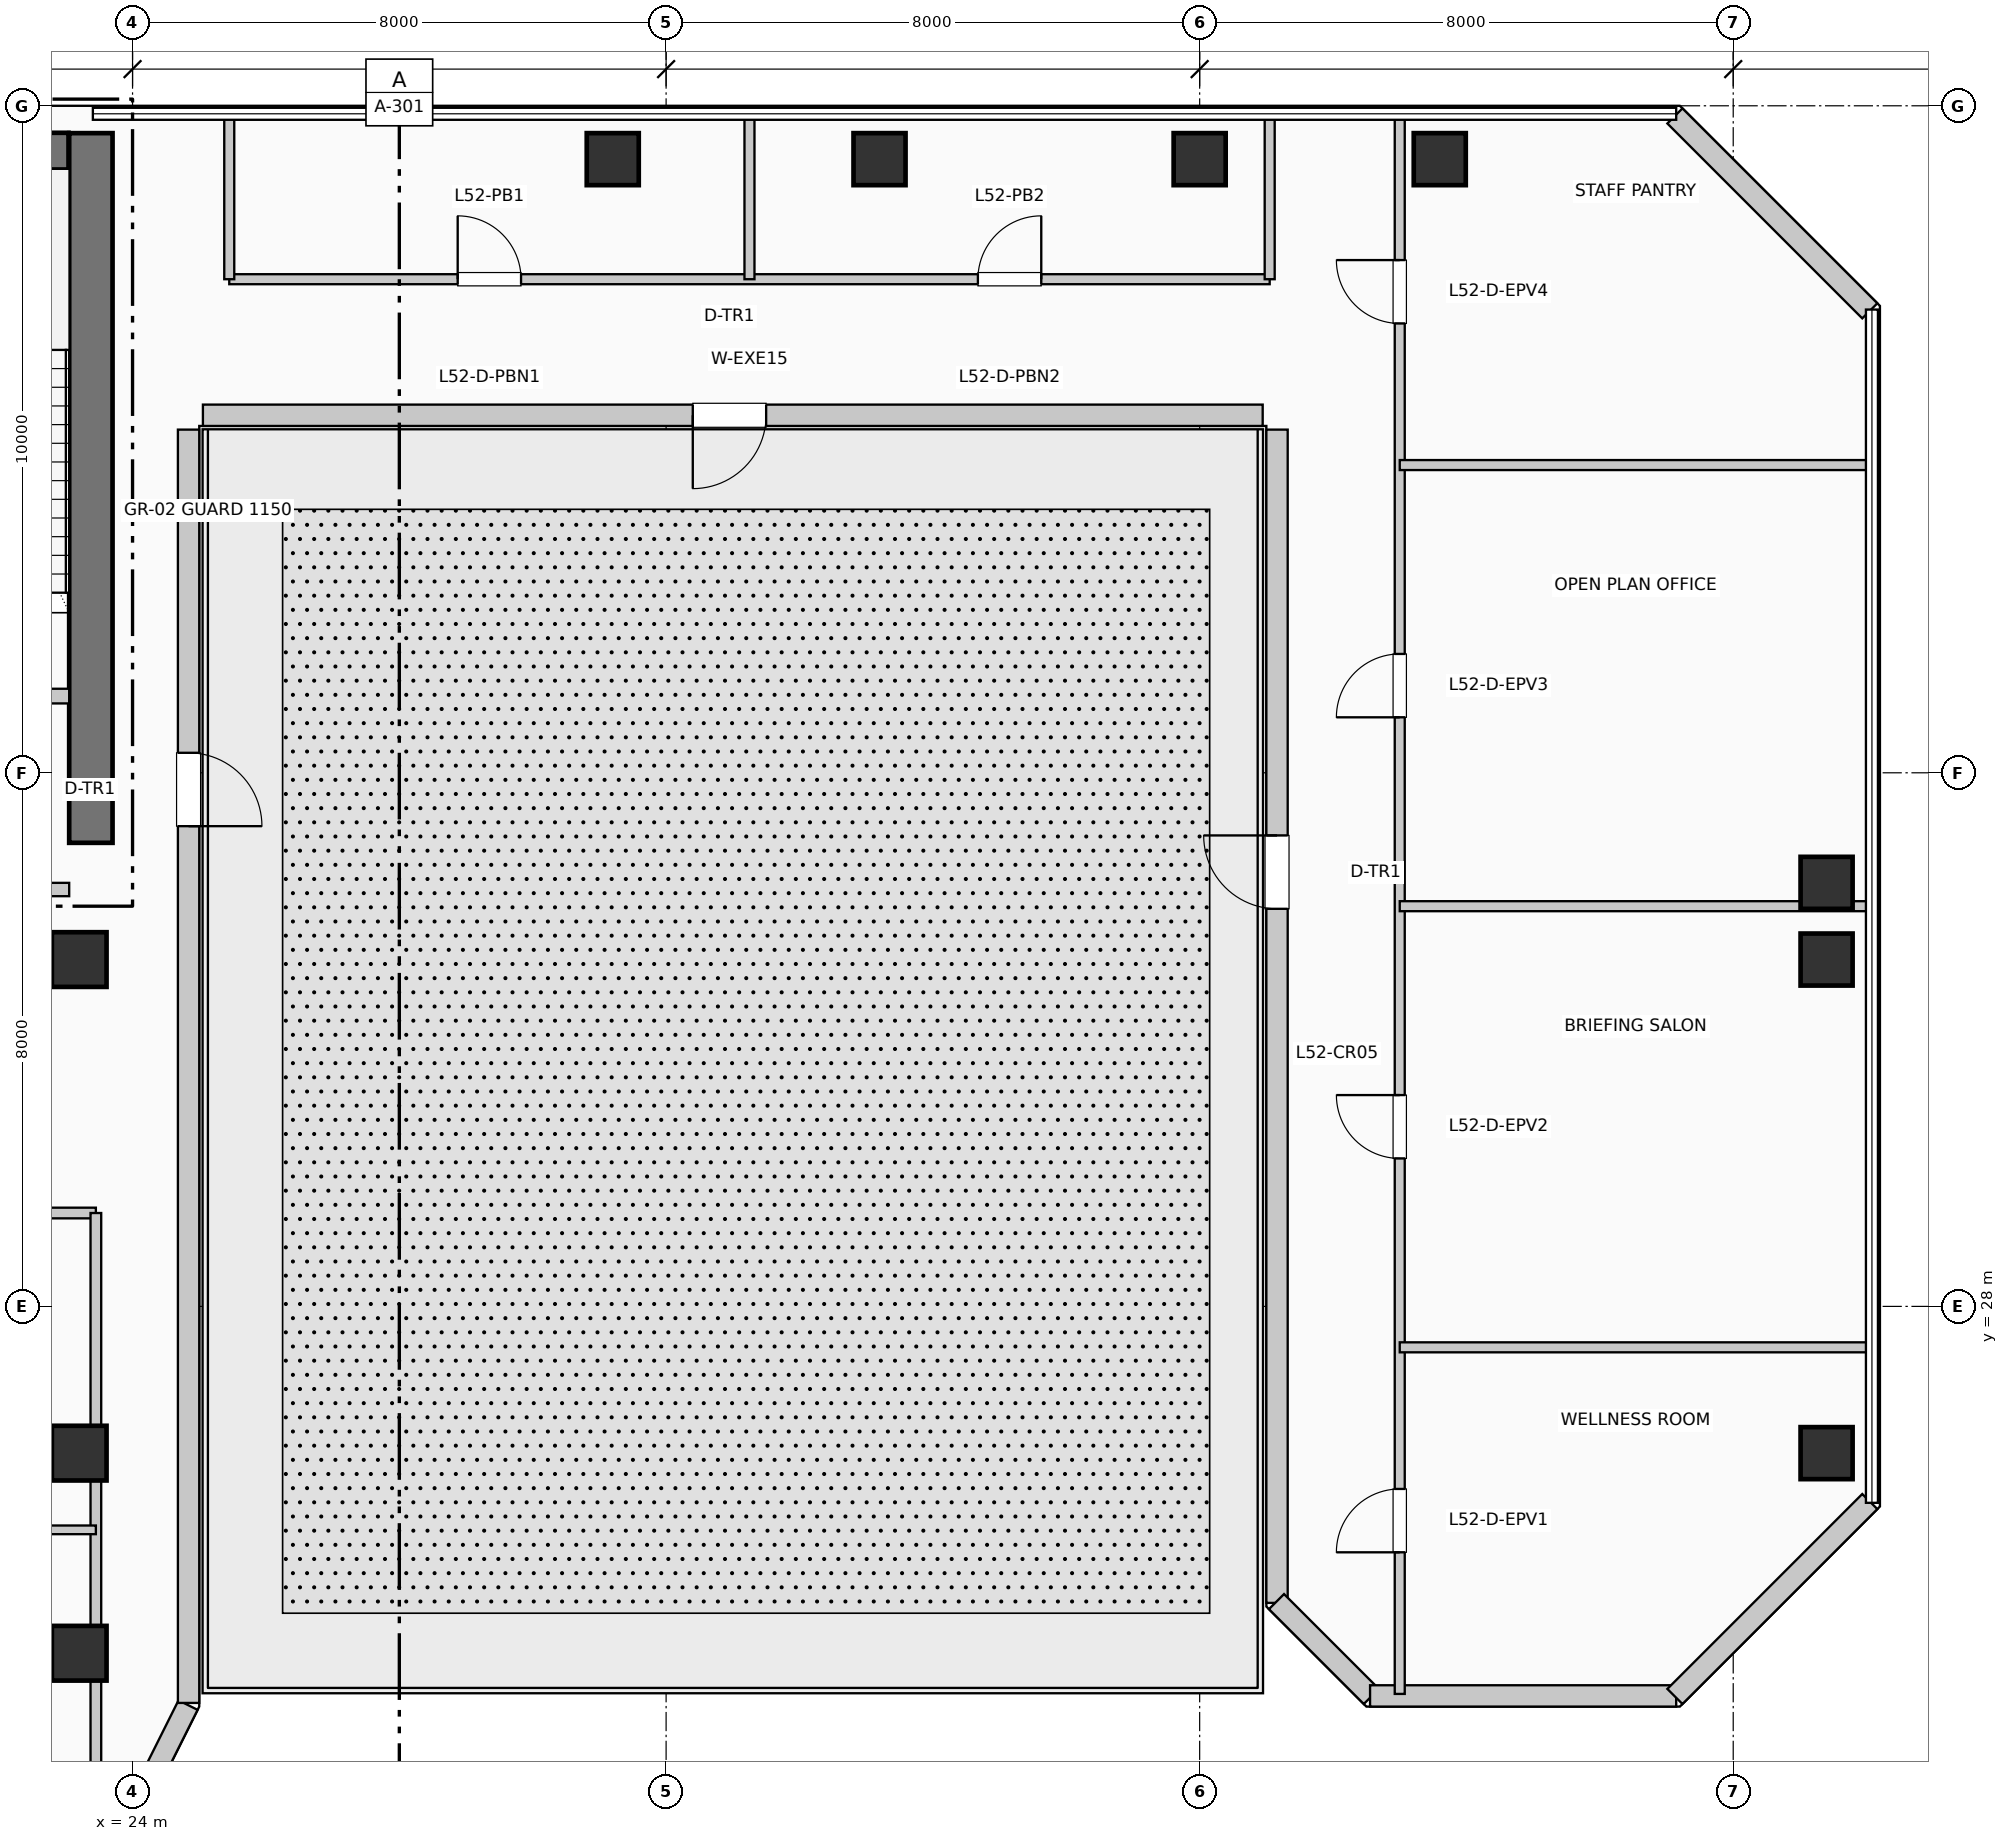
"""IFC4 building model, lengths in metres.
Left out: names, types, materials, properties, quantities, classifications, styles, units other than length and angle.
Written with IfcOpenShell. Run it as: python <this file> out.ifc"""

import sys

from ifc_helpers import new_model, si_unit, direction, frame, frame_2d, origin, origin_2d, place, context, subcontext, project, spatial, rectangle, extrude, element, fill, save


model = new_model("IFC4")
c1 = context("Model", 3, precision=1e-05, world=origin(), true_north=direction((0.0, 1.0)))
c2 = subcontext(c1, "Body", "Model", "MODEL_VIEW")
j1 = project(units=[si_unit("LENGTHUNIT", "METRE"), si_unit("PLANEANGLEUNIT", "RADIAN")], contexts=[c1])
p1 = place(None, origin())
s1 = spatial("IfcSite", under=j1, at=p1, CompositionType="ELEMENT")
p2 = place(p1, origin())
s2 = spatial("IfcBuilding", under=s1, at=p2, CompositionType="ELEMENT")
p3 = place(p2, frame((0.0, 0.0, 215.16)))
s3 = spatial("IfcBuildingStorey", under=s2, at=p3, CompositionType="ELEMENT", Elevation=215.16)
p4 = place(p3, frame((23.375, 34.95, 0.0), z_axis=(0.0, 0.0, 1.0), x_axis=(0.0, 1.0, 0.0)))
e1 = element("IfcWall", 1, at=p4, inside=s3, PredefinedType="SHEAR", context=c2, shape_type="SweptSolid", body=[
    extrude(rectangle(XDim=10.64, YDim=0.65, at=frame_2d((5.32, 0.0))), origin(), (0.0, 0.0, 1.0), 4.62),
])
p5 = place(p3, frame((19.35, 45.32, 0.0), z_axis=(0.0, 0.0, 1.0), x_axis=(1.0, 0.0, 0.0)))
e2 = element("IfcWall", 2, at=p5, inside=s3, PredefinedType="SHEAR", context=c2, shape_type="SweptSolid", body=[
    extrude(rectangle(XDim=3.69, YDim=0.55, at=frame_2d((1.845, 0.0))), origin(), (0.0, 0.0, 1.0), 4.62),
])
p6 = place(p5, frame((1.15, 0.0, 1.05)))
e3 = element("IfcOpeningElement", 3, at=p6, cuts=e2, PredefinedType="OPENING", context=c2, shape_type="SweptSolid", body=[
    extrude(rectangle(XDim=1.4, YDim=1.8, at=frame_2d((0.7, 0.9))), frame((0.0, 0.285, 0.0), z_axis=(0.0, -1.0, 0.0), x_axis=(1.0, 0.0, 0.0)), (0.0, 0.0, 1.0), 0.57),
])
for number, where, z_axis, x_axis in (
    (4, (23.2, 22.8, 0.0), (0.0, 0.0, 1.0), (1.0, 0.0, 0.0)),
    (5, (23.2, 25.8, 0.0), (0.0, 0.0, 1.0), (1.0, 0.0, 0.0)),
    (6, (23.2, 33.2, 0.0), (0.0, 0.0, 1.0), (1.0, 0.0, 0.0)),
):
    element("IfcColumn", number, at=place(p3, frame(where, z_axis=z_axis, x_axis=x_axis)), inside=s3, PredefinedType="COLUMN", context=c2, shape_type="SweptSolid", body=[
        extrude(rectangle(XDim=0.82, YDim=0.82, at=origin_2d()), origin(), (0.0, 0.0, 1.0), 4.62),
    ])
for number, where, z_axis, x_axis in (
    (7, (31.2, 45.2, 0.0), (0.0, 0.0, 1.0), (1.0, 0.0, 0.0)),
    (8, (35.2, 45.2, 0.0), (0.0, 0.0, 1.0), (1.0, 0.0, 0.0)),
    (9, (40.0, 45.2, 0.0), (0.0, 0.0, 1.0), (1.0, 0.0, 0.0)),
    (10, (43.6, 45.2, 0.0), (0.0, 0.0, 1.0), (1.0, 0.0, 0.0)),
    (11, (49.4, 25.8, 0.0), (0.0, 0.0, 1.0), (1.0, 0.0, 0.0)),
    (12, (49.4, 33.2, 0.0), (0.0, 0.0, 1.0), (1.0, 0.0, 0.0)),
    (13, (49.4, 34.35, 0.0), (0.0, 0.0, 1.0), (1.0, 0.0, 0.0)),
):
    element("IfcColumn", number, at=place(p3, frame(where, z_axis=z_axis, x_axis=x_axis)), inside=s3, PredefinedType="COLUMN", context=c2, shape_type="SweptSolid", body=[
        extrude(rectangle(XDim=0.78, YDim=0.78, at=origin_2d()), origin(), (0.0, 0.0, 1.0), 4.62),
    ])
p7 = place(p3, frame((23.882, 20.121, 0.0), z_axis=(0.0, 0.0, 1.0), x_axis=(0.447121734542, 0.894473115583, 0.0)))
e14 = element("IfcWall", 14, at=p7, inside=s3, PredefinedType="SOLIDWALL", context=c2, shape_type="SweptSolid", body=[
    extrude(rectangle(XDim=2.126, YDim=0.32, at=frame_2d((1.063, 0.0))), origin(), (0.0, 0.0, 1.0), 4.37),
])
p8 = place(p3, frame((24.84, 22.055, 0.0), z_axis=(0.0, 0.0, 1.0), x_axis=(0.0, 1.0, 0.0)))
e15 = element("IfcWall", 15, at=p8, inside=s3, PredefinedType="SOLIDWALL", context=c2, shape_type="SweptSolid", body=[
    extrude(rectangle(XDim=19.09, YDim=0.32, at=frame_2d((9.545, 0.0))), origin(), (0.0, 0.0, 1.0), 4.37),
])
p9 = place(p8, frame((14.245, 0.0, 0.0), z_axis=(0.0, 0.0, 1.0), x_axis=(-1.0, 0.0, 0.0)))
e16 = element("IfcOpeningElement", 16, at=p9, cuts=e15, PredefinedType="OPENING", context=c2, shape_type="SweptSolid", body=[
    extrude(rectangle(XDim=1.1, YDim=2.2, at=frame_2d((0.55, 1.1))), frame((0.0, 0.17, 0.0), z_axis=(0.0, -1.0, 0.0), x_axis=(1.0, 0.0, 0.0)), (0.0, 0.0, 1.0), 0.34),
])
p10 = place(p3, frame((25.055, 41.36, 0.0), z_axis=(0.0, 0.0, 1.0), x_axis=(1.0, 0.0, 0.0)))
e17 = element("IfcWall", 17, at=p10, inside=s3, PredefinedType="SOLIDWALL", context=c2, shape_type="SweptSolid", body=[
    extrude(rectangle(XDim=15.89, YDim=0.32, at=frame_2d((7.945, 0.0))), origin(), (0.0, 0.0, 1.0), 4.37),
])
p11 = place(p10, frame((8.445, 0.0, 0.0), z_axis=(0.0, 0.0, 1.0), x_axis=(-1.0, 0.0, 0.0)))
e18 = element("IfcOpeningElement", 18, at=p11, cuts=e17, PredefinedType="OPENING", context=c2, shape_type="SweptSolid", body=[
    extrude(rectangle(XDim=1.1, YDim=2.2, at=frame_2d((0.55, 1.1))), frame((0.0, 0.17, 0.0), z_axis=(0.0, -1.0, 0.0), x_axis=(1.0, 0.0, 0.0)), (0.0, 0.0, 1.0), 0.34),
])
p12 = place(p3, frame((41.16, 41.145, 0.0), z_axis=(0.0, 0.0, 1.0), x_axis=(0.0, -1.0, 0.0)))
e19 = element("IfcWall", 19, at=p12, inside=s3, PredefinedType="SOLIDWALL", context=c2, shape_type="SweptSolid", body=[
    extrude(rectangle(XDim=17.59, YDim=0.32, at=frame_2d((8.795, 0.0))), origin(), (0.0, 0.0, 1.0), 4.37),
])
p13 = place(p12, frame((7.184, 0.0, 0.0), z_axis=(0.0, 0.0, 1.0), x_axis=(-1.0, 0.0, 0.0)))
e20 = element("IfcOpeningElement", 20, at=p13, cuts=e19, PredefinedType="OPENING", context=c2, shape_type="SweptSolid", body=[
    extrude(rectangle(XDim=1.1, YDim=2.2, at=frame_2d((0.55, 1.1))), frame((0.0, 0.17, 0.0), z_axis=(0.0, -1.0, 0.0), x_axis=(1.0, 0.0, 0.0)), (0.0, 0.0, 1.0), 0.34),
])
p14 = place(p3, frame((41.152, 23.574, 0.0), z_axis=(0.0, 0.0, 1.0), x_axis=(0.707106781187, -0.707106781187, 0.0)))
e21 = element("IfcWall", 21, at=p14, inside=s3, PredefinedType="SOLIDWALL", context=c2, shape_type="SweptSolid", body=[
    extrude(rectangle(XDim=2.011, YDim=0.32, at=frame_2d((1.006, 0.0))), origin(), (0.0, 0.0, 1.0), 4.37),
])
p15 = place(p3, frame((42.555, 22.16, 0.0), z_axis=(0.0, 0.0, 1.0), x_axis=(1.0, 0.0, 0.0)))
e22 = element("IfcWall", 22, at=p15, inside=s3, PredefinedType="SOLIDWALL", context=c2, shape_type="SweptSolid", body=[
    extrude(rectangle(XDim=4.59, YDim=0.32, at=frame_2d((2.295, 0.0))), origin(), (0.0, 0.0, 1.0), 4.37),
])
for number, where, z_axis, x_axis in (
    (23, (47.126, 22.152, 0.0), (0.0, 0.0, 1.0), (0.707, 0.707, 0.0)),
    (24, (50.048, 42.926, 0.0), (0.0, 0.0, 1.0), (-0.707, 0.707, 0.0)),
):
    element("IfcWall", number, at=place(p3, frame(where, z_axis=z_axis, x_axis=x_axis)), inside=s3, PredefinedType="SOLIDWALL", context=c2, shape_type="SweptSolid", body=[
        extrude(rectangle(XDim=4.133, YDim=0.32, at=frame_2d((2.066, 0.0))), origin(), (0.0, 0.0, 1.0), 4.37),
    ])
p16 = place(p3, frame((19.9, 37.15, 0.0), z_axis=(0.0, 0.0, 1.0), x_axis=(1.0, 0.0, 0.0)))
e25 = element("IfcWall", 25, at=p16, inside=s3, PredefinedType="PARTITIONING", context=c2, shape_type="SweptSolid", body=[
    extrude(rectangle(XDim=3.15, YDim=0.22, at=frame_2d((1.575, 0.0))), origin(), (0.0, 0.0, 1.0), 4.37),
])
p17 = place(p16, frame((2.05, 0.0, 0.0), z_axis=(0.0, 0.0, 1.0), x_axis=(-1.0, 0.0, 0.0)))
e26 = element("IfcOpeningElement", 26, at=p17, cuts=e25, PredefinedType="OPENING", context=c2, shape_type="SweptSolid", body=[
    extrude(rectangle(XDim=1.05, YDim=2.15, at=frame_2d((0.525, 1.075))), frame((0.0, 0.12, 0.0), z_axis=(0.0, -1.0, 0.0), x_axis=(1.0, 0.0, 0.0)), (0.0, 0.0, 1.0), 0.24),
])
p18 = place(p3, frame((19.8, 34.25, 0.0), z_axis=(0.0, 0.0, 1.0), x_axis=(1.0, 0.0, 0.0)))
e27 = element("IfcWall", 27, at=p18, inside=s3, PredefinedType="PARTITIONING", context=c2, shape_type="SweptSolid", body=[
    extrude(rectangle(XDim=3.25, YDim=0.2, at=frame_2d((1.625, 0.0))), origin(), (0.0, 0.0, 1.0), 4.37),
])
p19 = place(p18, frame((2.15, 0.0, 0.0), z_axis=(0.0, 0.0, 1.0), x_axis=(-1.0, 0.0, 0.0)))
e28 = element("IfcOpeningElement", 28, at=p19, cuts=e27, PredefinedType="OPENING", context=c2, shape_type="SweptSolid", body=[
    extrude(rectangle(XDim=1.1, YDim=2.15, at=frame_2d((0.55, 1.075))), frame((0.0, 0.11, 0.0), z_axis=(0.0, -1.0, 0.0), x_axis=(1.0, 0.0, 0.0)), (0.0, 0.0, 1.0), 0.22),
])
p20 = place(p3, frame((19.24, 29.4, 0.0), z_axis=(0.0, 0.0, 1.0), x_axis=(1.0, 0.0, 0.0)))
e29 = element("IfcWall", 29, at=p20, inside=s3, PredefinedType="PARTITIONING", context=c2, shape_type="SweptSolid", body=[
    extrude(rectangle(XDim=4.21, YDim=0.16, at=frame_2d((2.105, 0.0))), origin(), (0.0, 0.0, 1.0), 4.025),
])
p21 = place(p3, frame((23.45, 5.99, 0.0), z_axis=(0.0, 0.0, 1.0), x_axis=(0.0, 1.0, 0.0)))
e30 = element("IfcWall", 30, at=p21, inside=s3, PredefinedType="PARTITIONING", context=c2, shape_type="SweptSolid", body=[
    extrude(rectangle(XDim=23.41, YDim=0.16, at=frame_2d((11.705, 0.0))), origin(), (0.0, 0.0, 1.0), 3.755),
])
p22 = place(p3, frame((19.24, 24.65, 0.0), z_axis=(0.0, 0.0, 1.0), x_axis=(1.0, 0.0, 0.0)))
e31 = element("IfcWall", 31, at=p22, inside=s3, PredefinedType="PARTITIONING", context=c2, shape_type="SweptSolid", body=[
    extrude(rectangle(XDim=4.21, YDim=0.13, at=frame_2d((2.105, 0.0))), origin(), (0.0, 0.0, 1.0), 4.37),
])
p23 = place(p3, frame((25.45, 43.4, 0.0), z_axis=(0.0, 0.0, 1.0), x_axis=(1.0, 0.0, 0.0)))
e32 = element("IfcWall", 32, at=p23, inside=s3, PredefinedType="PARTITIONING", context=c2, shape_type="SweptSolid", body=[
    extrude(rectangle(XDim=15.6, YDim=0.15, at=frame_2d((7.8, 0.0))), origin(), (0.0, 0.0, 1.0), 4.37),
])
p24 = place(p23, frame((3.425, 0.0, 0.0)))
e33 = element("IfcOpeningElement", 33, at=p24, cuts=e32, PredefinedType="OPENING", context=c2, shape_type="SweptSolid", body=[
    extrude(rectangle(XDim=0.95, YDim=2.15, at=frame_2d((0.475, 1.075))), frame((0.0, 0.085, 0.0), z_axis=(0.0, -1.0, 0.0), x_axis=(1.0, 0.0, 0.0)), (0.0, 0.0, 1.0), 0.17),
])
p25 = place(p23, frame((11.225, 0.0, 0.0)))
e34 = element("IfcOpeningElement", 34, at=p25, cuts=e32, PredefinedType="OPENING", context=c2, shape_type="SweptSolid", body=[
    extrude(rectangle(XDim=0.95, YDim=2.15, at=frame_2d((0.475, 1.075))), frame((0.0, 0.085, 0.0), z_axis=(0.0, -1.0, 0.0), x_axis=(1.0, 0.0, 0.0)), (0.0, 0.0, 1.0), 0.17),
])
for number, where, z_axis, x_axis in (
    (35, (25.45, 43.4, 0.0), (0.0, 0.0, 1.0), (0.0, 1.0, 0.0)),
    (36, (41.05, 43.4, 0.0), (0.0, 0.0, 1.0), (0.0, 1.0, 0.0)),
    (37, (33.25, 43.4, 0.0), (0.0, 0.0, 1.0), (0.0, 1.0, 0.0)),
):
    element("IfcWall", number, at=place(p3, frame(where, z_axis=z_axis, x_axis=x_axis)), inside=s3, PredefinedType="PARTITIONING", context=c2, shape_type="SweptSolid", body=[
        extrude(rectangle(XDim=2.41, YDim=0.15, at=frame_2d((1.205, 0.0))), origin(), (0.0, 0.0, 1.0), 4.37),
    ])
p26 = place(p3, frame((43.0, 22.19, 0.0), z_axis=(0.0, 0.0, 1.0), x_axis=(0.0, 1.0, 0.0)))
e38 = element("IfcWall", 38, at=p26, inside=s3, PredefinedType="PARTITIONING", context=c2, shape_type="SweptSolid", body=[
    extrude(rectangle(XDim=23.62, YDim=0.15, at=frame_2d((11.81, 0.0))), origin(), (0.0, 0.0, 1.0), 4.37),
])
p27 = place(p26, frame((2.123, 0.0, 0.0)))
e39 = element("IfcOpeningElement", 39, at=p27, cuts=e38, PredefinedType="OPENING", context=c2, shape_type="SweptSolid", body=[
    extrude(rectangle(XDim=0.95, YDim=2.15, at=frame_2d((0.475, 1.075))), frame((0.0, 0.085, 0.0), z_axis=(0.0, -1.0, 0.0), x_axis=(1.0, 0.0, 0.0)), (0.0, 0.0, 1.0), 0.17),
])
p28 = place(p26, frame((8.028, 0.0, 0.0)))
e40 = element("IfcOpeningElement", 40, at=p28, cuts=e38, PredefinedType="OPENING", context=c2, shape_type="SweptSolid", body=[
    extrude(rectangle(XDim=0.95, YDim=2.15, at=frame_2d((0.475, 1.075))), frame((0.0, 0.085, 0.0), z_axis=(0.0, -1.0, 0.0), x_axis=(1.0, 0.0, 0.0)), (0.0, 0.0, 1.0), 0.17),
])
p29 = place(p26, frame((14.642, 0.0, 0.0)))
e41 = element("IfcOpeningElement", 41, at=p29, cuts=e38, PredefinedType="OPENING", context=c2, shape_type="SweptSolid", body=[
    extrude(rectangle(XDim=0.95, YDim=2.15, at=frame_2d((0.475, 1.075))), frame((0.0, 0.085, 0.0), z_axis=(0.0, -1.0, 0.0), x_axis=(1.0, 0.0, 0.0)), (0.0, 0.0, 1.0), 0.17),
])
p30 = place(p26, frame((20.547, 0.0, 0.0)))
e42 = element("IfcOpeningElement", 42, at=p30, cuts=e38, PredefinedType="OPENING", context=c2, shape_type="SweptSolid", body=[
    extrude(rectangle(XDim=0.95, YDim=2.15, at=frame_2d((0.475, 1.075))), frame((0.0, 0.085, 0.0), z_axis=(0.0, -1.0, 0.0), x_axis=(1.0, 0.0, 0.0)), (0.0, 0.0, 1.0), 0.17),
])
for number, where, z_axis, x_axis in (
    (43, (43.0, 27.386, 0.0), (0.0, 0.0, 1.0), (1.0, 0.0, 0.0)),
    (44, (43.0, 34.0, 0.0), (0.0, 0.0, 1.0), (1.0, 0.0, 0.0)),
    (45, (43.0, 40.614, 0.0), (0.0, 0.0, 1.0), (1.0, 0.0, 0.0)),
):
    element("IfcWall", number, at=place(p3, frame(where, z_axis=z_axis, x_axis=x_axis)), inside=s3, PredefinedType="PARTITIONING", context=c2, shape_type="SweptSolid", body=[
        extrude(rectangle(XDim=7.01, YDim=0.15, at=frame_2d((3.505, 0.0))), origin(), (0.0, 0.0, 1.0), 4.37),
    ])
p31 = place(p9, origin())
e46 = element("IfcDoor", 46, at=p31, inside=s3, OperationType="SINGLE_SWING_LEFT", PredefinedType="DOOR", context=c2, shape_type="SweptSolid", body=[
    extrude(rectangle(XDim=1.1, YDim=2.2, at=frame_2d((0.55, 1.1))), frame((0.0, 0.025, 0.0), z_axis=(0.0, -1.0, 0.0), x_axis=(1.0, 0.0, 0.0)), (0.0, 0.0, 1.0), 0.05),
])
fill(e16, e46)
p32 = place(p11, origin())
e47 = element("IfcDoor", 47, at=p32, inside=s3, OperationType="SINGLE_SWING_LEFT", PredefinedType="DOOR", context=c2, shape_type="SweptSolid", body=[
    extrude(rectangle(XDim=1.1, YDim=2.2, at=frame_2d((0.55, 1.1))), frame((0.0, 0.025, 0.0), z_axis=(0.0, -1.0, 0.0), x_axis=(1.0, 0.0, 0.0)), (0.0, 0.0, 1.0), 0.05),
])
fill(e18, e47)
p33 = place(p13, origin())
e48 = element("IfcDoor", 48, at=p33, inside=s3, OperationType="SINGLE_SWING_LEFT", PredefinedType="DOOR", context=c2, shape_type="SweptSolid", body=[
    extrude(rectangle(XDim=1.1, YDim=2.2, at=frame_2d((0.55, 1.1))), frame((0.0, 0.025, 0.0), z_axis=(0.0, -1.0, 0.0), x_axis=(1.0, 0.0, 0.0)), (0.0, 0.0, 1.0), 0.05),
])
fill(e20, e48)
p34 = place(p24, origin())
e49 = element("IfcDoor", 49, at=p34, inside=s3, OperationType="SINGLE_SWING_LEFT", PredefinedType="DOOR", context=c2, shape_type="SweptSolid", body=[
    extrude(rectangle(XDim=0.95, YDim=2.15, at=frame_2d((0.475, 1.075))), frame((0.0, 0.025, 0.0), z_axis=(0.0, -1.0, 0.0), x_axis=(1.0, 0.0, 0.0)), (0.0, 0.0, 1.0), 0.05),
])
fill(e33, e49)
p35 = place(p25, origin())
e50 = element("IfcDoor", 50, at=p35, inside=s3, OperationType="SINGLE_SWING_RIGHT", PredefinedType="DOOR", context=c2, shape_type="SweptSolid", body=[
    extrude(rectangle(XDim=0.95, YDim=2.15, at=frame_2d((0.475, 1.075))), frame((0.0, 0.025, 0.0), z_axis=(0.0, -1.0, 0.0), x_axis=(1.0, 0.0, 0.0)), (0.0, 0.0, 1.0), 0.05),
])
fill(e34, e50)
p36 = place(p27, origin())
e51 = element("IfcDoor", 51, at=p36, inside=s3, OperationType="SINGLE_SWING_LEFT", PredefinedType="DOOR", context=c2, shape_type="SweptSolid", body=[
    extrude(rectangle(XDim=0.95, YDim=2.15, at=frame_2d((0.475, 1.075))), frame((0.0, 0.025, 0.0), z_axis=(0.0, -1.0, 0.0), x_axis=(1.0, 0.0, 0.0)), (0.0, 0.0, 1.0), 0.05),
])
fill(e39, e51)
p37 = place(p28, origin())
e52 = element("IfcDoor", 52, at=p37, inside=s3, OperationType="SINGLE_SWING_RIGHT", PredefinedType="DOOR", context=c2, shape_type="SweptSolid", body=[
    extrude(rectangle(XDim=0.95, YDim=2.15, at=frame_2d((0.475, 1.075))), frame((0.0, 0.025, 0.0), z_axis=(0.0, -1.0, 0.0), x_axis=(1.0, 0.0, 0.0)), (0.0, 0.0, 1.0), 0.05),
])
fill(e40, e52)
p38 = place(p29, origin())
e53 = element("IfcDoor", 53, at=p38, inside=s3, OperationType="SINGLE_SWING_LEFT", PredefinedType="DOOR", context=c2, shape_type="SweptSolid", body=[
    extrude(rectangle(XDim=0.95, YDim=2.15, at=frame_2d((0.475, 1.075))), frame((0.0, 0.025, 0.0), z_axis=(0.0, -1.0, 0.0), x_axis=(1.0, 0.0, 0.0)), (0.0, 0.0, 1.0), 0.05),
])
fill(e41, e53)
p39 = place(p30, origin())
e54 = element("IfcDoor", 54, at=p39, inside=s3, OperationType="SINGLE_SWING_RIGHT", PredefinedType="DOOR", context=c2, shape_type="SweptSolid", body=[
    extrude(rectangle(XDim=0.95, YDim=2.15, at=frame_2d((0.475, 1.075))), frame((0.0, 0.025, 0.0), z_axis=(0.0, -1.0, 0.0), x_axis=(1.0, 0.0, 0.0)), (0.0, 0.0, 1.0), 0.05),
])
fill(e42, e54)
save(model, sys.argv[1])
